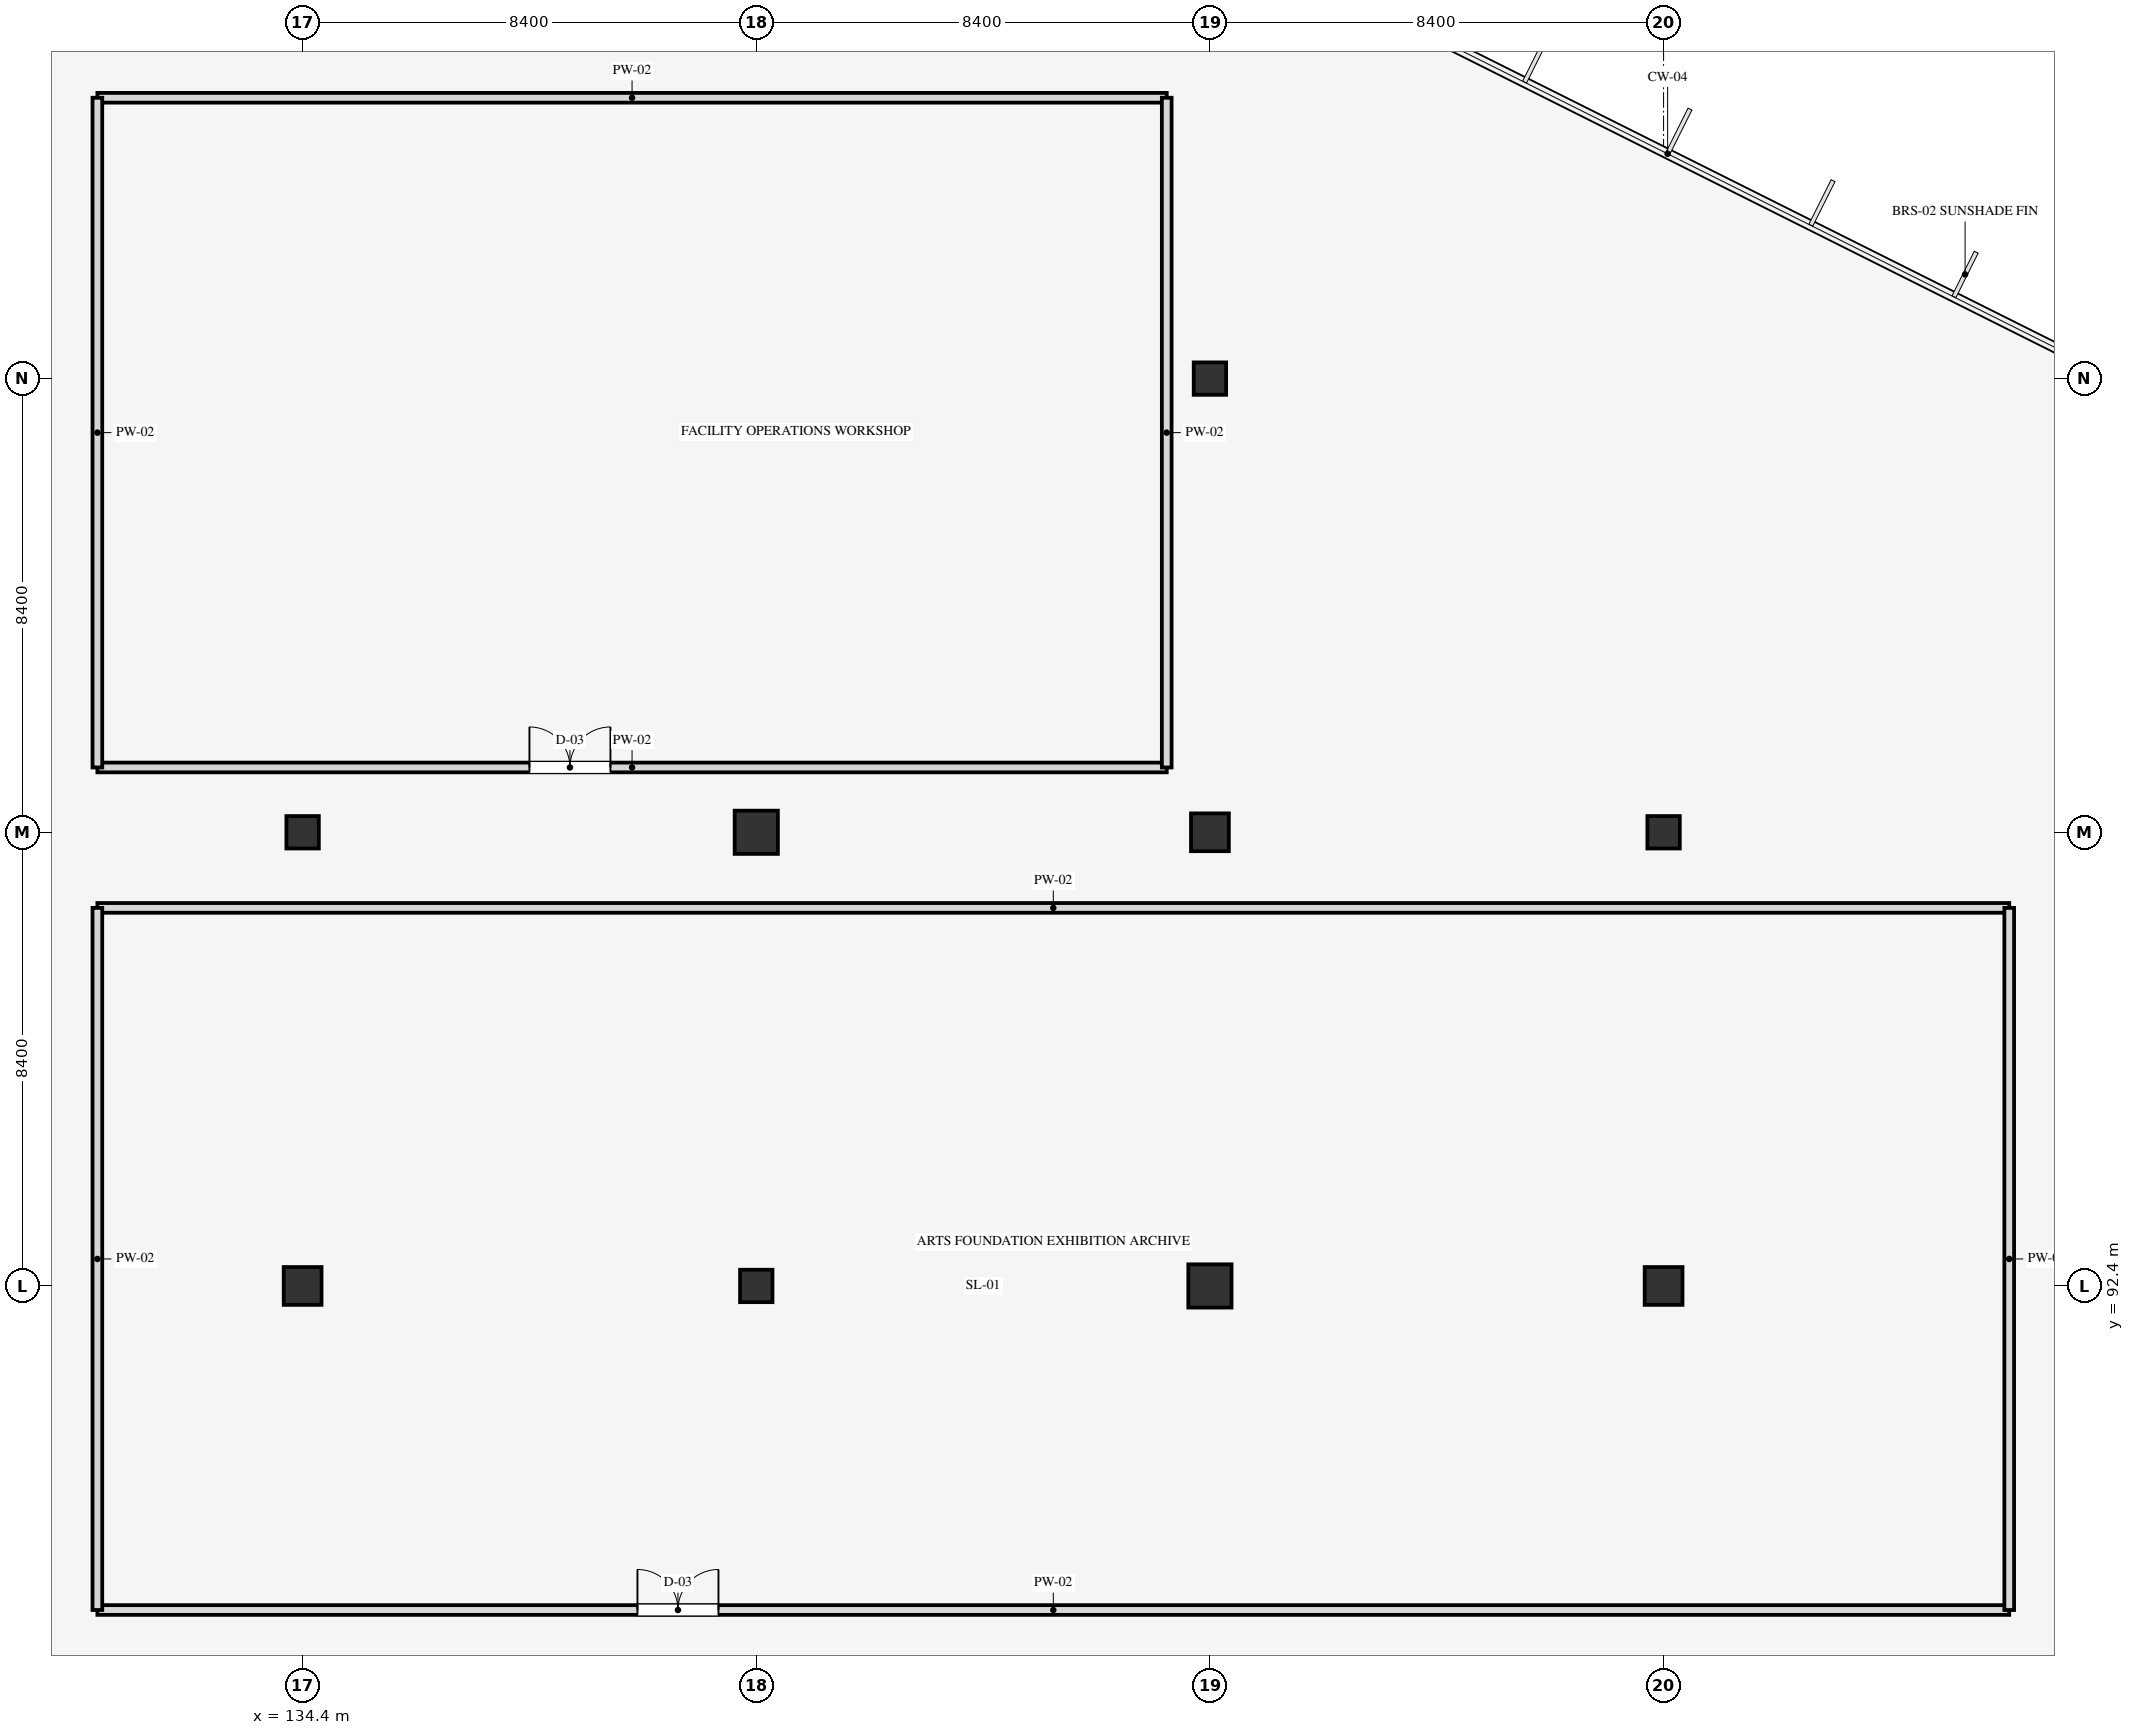
"""IFC4 building model, lengths in metres.
Left out: names, types, materials, properties, quantities, classifications, styles, units other than length and angle.
Written with IfcOpenShell. Run it as: python <this file> out.ifc"""

import sys

from ifc_helpers import new_model, si_unit, direction, frame, frame_2d, origin, origin_2d, place, context, subcontext, project, spatial, rectangle, extrude, element, fill, save


model = new_model("IFC4")
c1 = context("Model", 3, precision=1e-05, world=origin(), true_north=direction((0.0, 1.0)))
c2 = subcontext(c1, "Body", "Model", "MODEL_VIEW")
j1 = project(units=[si_unit("LENGTHUNIT", "METRE"), si_unit("PLANEANGLEUNIT", "RADIAN")], contexts=[c1])
p1 = place(None, origin())
s1 = spatial("IfcSite", under=j1, at=p1, CompositionType="ELEMENT")
p2 = place(p1, origin())
s2 = spatial("IfcBuilding", under=s1, at=p2, CompositionType="ELEMENT")
p3 = place(p2, origin())
s3 = spatial("IfcBuildingStorey", under=s2, at=p3, CompositionType="ELEMENT", Elevation=0.0)
p4 = place(p3, frame((134.4, 92.4, 0.0), z_axis=(0.0, 0.0, 1.0), x_axis=(1.0, 0.0, 0.0)))
e1 = element("IfcColumn", 1, at=p4, inside=s3, PredefinedType="COLUMN", context=c2, shape_type="SweptSolid", body=[
    extrude(rectangle(XDim=0.7, YDim=0.7, at=origin_2d()), origin(), (0.0, 0.0, 1.0), 5.4),
])
for number, where, z_axis, x_axis in (
    (2, (134.4, 100.8, 0.0), (0.0, 0.0, 1.0), (1.0, 0.0, 0.0)),
    (3, (142.8, 92.4, 0.0), (0.0, 0.0, 1.0), (1.0, 0.0, 0.0)),
):
    element("IfcColumn", number, at=place(p3, frame(where, z_axis=z_axis, x_axis=x_axis)), inside=s3, PredefinedType="COLUMN", context=c2, shape_type="SweptSolid", body=[
        extrude(rectangle(XDim=0.6, YDim=0.6, at=origin_2d()), origin(), (0.0, 0.0, 1.0), 5.4),
    ])
for number, where, z_axis, x_axis in (
    (4, (142.8, 100.8, 0.0), (0.0, 0.0, 1.0), (1.0, 0.0, 0.0)),
    (5, (151.2, 92.4, 0.0), (0.0, 0.0, 1.0), (1.0, 0.0, 0.0)),
):
    element("IfcColumn", number, at=place(p3, frame(where, z_axis=z_axis, x_axis=x_axis)), inside=s3, PredefinedType="COLUMN", context=c2, shape_type="SweptSolid", body=[
        extrude(rectangle(XDim=0.8, YDim=0.8, at=origin_2d()), origin(), (0.0, 0.0, 1.0), 5.4),
    ])
p5 = place(p3, frame((151.2, 100.8, 0.0), z_axis=(0.0, 0.0, 1.0), x_axis=(1.0, 0.0, 0.0)))
e6 = element("IfcColumn", 6, at=p5, inside=s3, PredefinedType="COLUMN", context=c2, shape_type="SweptSolid", body=[
    extrude(rectangle(XDim=0.7, YDim=0.7, at=origin_2d()), origin(), (0.0, 0.0, 1.0), 5.4),
])
p6 = place(p3, frame((151.2, 109.2, 0.0), z_axis=(0.0, 0.0, 1.0), x_axis=(1.0, 0.0, 0.0)))
e7 = element("IfcColumn", 7, at=p6, inside=s3, PredefinedType="COLUMN", context=c2, shape_type="SweptSolid", body=[
    extrude(rectangle(XDim=0.6, YDim=0.6, at=origin_2d()), origin(), (0.0, 0.0, 1.0), 5.4),
])
p7 = place(p3, frame((159.6, 92.4, 0.0), z_axis=(0.0, 0.0, 1.0), x_axis=(1.0, 0.0, 0.0)))
e8 = element("IfcColumn", 8, at=p7, inside=s3, PredefinedType="COLUMN", context=c2, shape_type="SweptSolid", body=[
    extrude(rectangle(XDim=0.7, YDim=0.7, at=origin_2d()), origin(), (0.0, 0.0, 1.0), 5.4),
])
p8 = place(p3, frame((159.6, 100.8, 0.0), z_axis=(0.0, 0.0, 1.0), x_axis=(1.0, 0.0, 0.0)))
e9 = element("IfcColumn", 9, at=p8, inside=s3, PredefinedType="COLUMN", context=c2, shape_type="SweptSolid", body=[
    extrude(rectangle(XDim=0.6, YDim=0.6, at=origin_2d()), origin(), (0.0, 0.0, 1.0), 5.4),
])
p9 = place(p3, frame((130.6, 102.0, 0.0), z_axis=(0.0, 0.0, 1.0), x_axis=(1.0, 0.0, 0.0)))
e10 = element("IfcWall", 10, at=p9, inside=s3, PredefinedType="PARTITIONING", context=c2, shape_type="SweptSolid", body=[
    extrude(rectangle(XDim=19.8, YDim=0.18, at=frame_2d((9.9, 0.0))), origin(), (0.0, 0.0, 1.0), 4.44),
])
p10 = place(p9, frame((8.0, 0.0, 0.0)))
e11 = element("IfcOpeningElement", 11, at=p10, cuts=e10, PredefinedType="OPENING", context=c2, shape_type="SweptSolid", body=[
    extrude(rectangle(XDim=1.5, YDim=2.2, at=frame_2d((0.75, 1.1))), frame((0.0, 0.1, 0.0), z_axis=(0.0, -1.0, 0.0), x_axis=(1.0, 0.0, 0.0)), (0.0, 0.0, 1.0), 0.2),
])
p11 = place(p3, frame((130.6, 114.4, 0.0), z_axis=(0.0, 0.0, 1.0), x_axis=(1.0, 0.0, 0.0)))
e12 = element("IfcWall", 12, at=p11, inside=s3, PredefinedType="PARTITIONING", context=c2, shape_type="SweptSolid", body=[
    extrude(rectangle(XDim=19.8, YDim=0.18, at=frame_2d((9.9, 0.0))), origin(), (0.0, 0.0, 1.0), 4.44),
])
for number, where, z_axis, x_axis in (
    (13, (130.6, 102.0, 0.0), (0.0, 0.0, 1.0), (0.0, 1.0, 0.0)),
    (14, (150.4, 102.0, 0.0), (0.0, 0.0, 1.0), (0.0, 1.0, 0.0)),
):
    element("IfcWall", number, at=place(p3, frame(where, z_axis=z_axis, x_axis=x_axis)), inside=s3, PredefinedType="PARTITIONING", context=c2, shape_type="SweptSolid", body=[
        extrude(rectangle(XDim=12.4, YDim=0.18, at=frame_2d((6.2, 0.0))), origin(), (0.0, 0.0, 1.0), 4.44),
    ])
p12 = place(p3, frame((130.6, 86.4, 0.0), z_axis=(0.0, 0.0, 1.0), x_axis=(1.0, 0.0, 0.0)))
e15 = element("IfcWall", 15, at=p12, inside=s3, PredefinedType="PARTITIONING", context=c2, shape_type="SweptSolid", body=[
    extrude(rectangle(XDim=35.4, YDim=0.18, at=frame_2d((17.7, 0.0))), origin(), (0.0, 0.0, 1.0), 4.44),
])
p13 = place(p12, frame((10.0, 0.0, 0.0)))
e16 = element("IfcOpeningElement", 16, at=p13, cuts=e15, PredefinedType="OPENING", context=c2, shape_type="SweptSolid", body=[
    extrude(rectangle(XDim=1.5, YDim=2.2, at=frame_2d((0.75, 1.1))), frame((0.0, 0.1, 0.0), z_axis=(0.0, -1.0, 0.0), x_axis=(1.0, 0.0, 0.0)), (0.0, 0.0, 1.0), 0.2),
])
p14 = place(p3, frame((130.6, 99.4, 0.0), z_axis=(0.0, 0.0, 1.0), x_axis=(1.0, 0.0, 0.0)))
e17 = element("IfcWall", 17, at=p14, inside=s3, PredefinedType="PARTITIONING", context=c2, shape_type="SweptSolid", body=[
    extrude(rectangle(XDim=35.4, YDim=0.18, at=frame_2d((17.7, 0.0))), origin(), (0.0, 0.0, 1.0), 4.44),
])
for number, where, z_axis, x_axis in (
    (18, (130.6, 86.4, 0.0), (0.0, 0.0, 1.0), (0.0, 1.0, 0.0)),
    (19, (166.0, 86.4, 0.0), (0.0, 0.0, 1.0), (0.0, 1.0, 0.0)),
):
    element("IfcWall", number, at=place(p3, frame(where, z_axis=z_axis, x_axis=x_axis)), inside=s3, PredefinedType="PARTITIONING", context=c2, shape_type="SweptSolid", body=[
        extrude(rectangle(XDim=13.0, YDim=0.18, at=frame_2d((6.5, 0.0))), origin(), (0.0, 0.0, 1.0), 4.44),
    ])
p15 = place(p10, origin())
e20 = element("IfcDoor", 20, at=p15, inside=s3, OperationType="DOUBLE_DOOR_SINGLE_SWING", PredefinedType="DOOR", context=c2, shape_type="SweptSolid", body=[
    extrude(rectangle(XDim=1.5, YDim=2.2, at=frame_2d((0.75, 1.1))), frame((0.0, 0.025, 0.0), z_axis=(0.0, -1.0, 0.0), x_axis=(1.0, 0.0, 0.0)), (0.0, 0.0, 1.0), 0.05),
])
fill(e11, e20)
p16 = place(p13, origin())
e21 = element("IfcDoor", 21, at=p16, inside=s3, OperationType="DOUBLE_DOOR_SINGLE_SWING", PredefinedType="DOOR", context=c2, shape_type="SweptSolid", body=[
    extrude(rectangle(XDim=1.5, YDim=2.2, at=frame_2d((0.75, 1.1))), frame((0.0, 0.025, 0.0), z_axis=(0.0, -1.0, 0.0), x_axis=(1.0, 0.0, 0.0)), (0.0, 0.0, 1.0), 0.05),
])
fill(e16, e21)
save(model, sys.argv[1])
